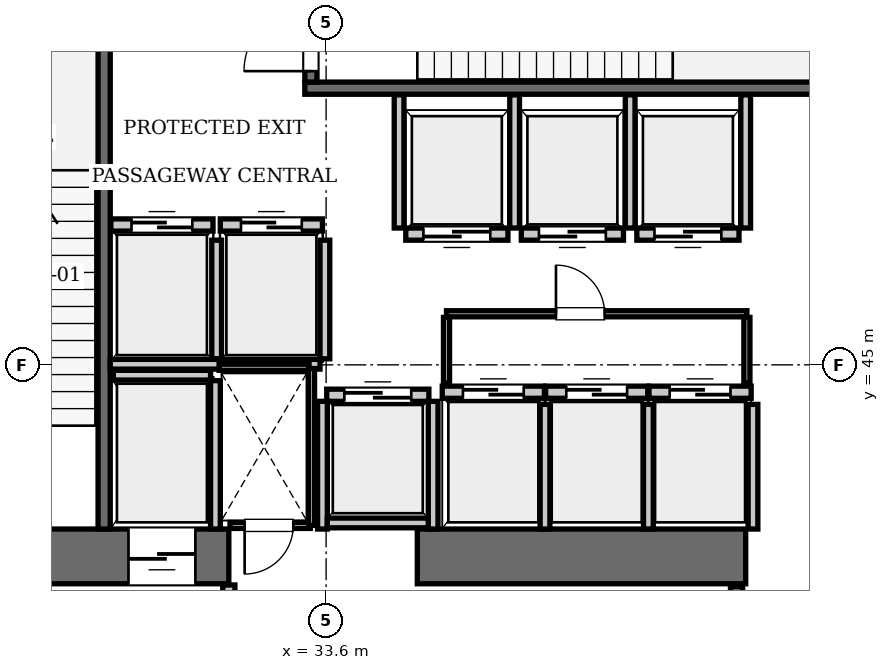
"""IFC4 building model, lengths in metres.
Left out: names, types, materials, properties, quantities, classifications, styles, units other than length and angle.
Written with IfcOpenShell. Run it as: python <this file> out.ifc"""

import sys

from ifc_helpers import new_model, si_unit, direction, frame, frame_2d, origin, place, context, subcontext, project, spatial, rectangle, extrude, element, fill, save


model = new_model("IFC4")
c1 = context("Model", 3, precision=1e-05, world=origin(), true_north=direction((0.0, 1.0)))
c2 = subcontext(c1, "Body", "Model", "MODEL_VIEW")
j1 = project(units=[si_unit("LENGTHUNIT", "METRE"), si_unit("PLANEANGLEUNIT", "RADIAN")], contexts=[c1])
p1 = place(None, origin())
s1 = spatial("IfcSite", under=j1, at=p1, CompositionType="ELEMENT")
p2 = place(p1, origin())
s2 = spatial("IfcBuilding", under=s1, at=p2, CompositionType="ELEMENT")
p3 = place(p2, origin())
s3 = spatial("IfcBuildingStorey", under=s2, at=p3, CompositionType="ELEMENT", Elevation=0.0)
p4 = place(p3, frame((25.2, 41.85, 0.0), z_axis=(0.0, 0.0, 1.0), x_axis=(1.0, 0.0, 0.0)))
e1 = element("IfcWall", 1, at=p4, inside=s3, PredefinedType="SHEAR", context=c2, shape_type="SweptSolid", body=[
    extrude(rectangle(XDim=6.8, YDim=0.9, at=frame_2d((3.4, 0.0))), origin(), (0.0, 0.0, 1.0), 5.6),
])
p5 = place(p4, frame((1.65, 0.0, 0.0)))
e2 = element("IfcOpeningElement", 2, at=p5, cuts=e1, PredefinedType="OPENING", context=c2, shape_type="SweptSolid", body=[
    extrude(rectangle(XDim=1.15, YDim=2.15, at=frame_2d((0.575, 1.075))), frame((0.0, 0.46, 0.0), z_axis=(0.0, -1.0, 0.0), x_axis=(1.0, 0.0, 0.0)), (0.0, 0.0, 1.0), 0.92),
])
p6 = place(p4, frame((5.15, 0.0, 0.0)))
e3 = element("IfcOpeningElement", 3, at=p6, cuts=e1, PredefinedType="OPENING", context=c2, shape_type="SweptSolid", body=[
    extrude(rectangle(XDim=1.1, YDim=2.2, at=frame_2d((0.55, 1.1))), frame((0.0, 0.46, 0.0), z_axis=(0.0, -1.0, 0.0), x_axis=(1.0, 0.0, 0.0)), (0.0, 0.0, 1.0), 0.92),
])
p7 = place(p3, frame((35.1, 41.85, 0.0), z_axis=(0.0, 0.0, 1.0), x_axis=(1.0, 0.0, 0.0)))
e4 = element("IfcWall", 4, at=p7, inside=s3, PredefinedType="SHEAR", context=c2, shape_type="SweptSolid", body=[
    extrude(rectangle(XDim=5.4, YDim=0.9, at=frame_2d((2.7, 0.0))), origin(), (0.0, 0.0, 1.0), 5.6),
])
p8 = place(p3, frame((29.95, 42.3, 0.0), z_axis=(0.0, 0.0, 1.0), x_axis=(0.0, 1.0, 0.0)))
e5 = element("IfcWall", 5, at=p8, inside=s3, PredefinedType="SOLIDWALL", context=c2, shape_type="SweptSolid", body=[
    extrude(rectangle(XDim=8.85, YDim=0.2, at=frame_2d((4.425, 0.0))), origin(), (0.0, 0.0, 1.0), 5.32),
])
p9 = place(p3, frame((33.25, 49.55, 0.0), z_axis=(0.0, 0.0, 1.0), x_axis=(1.0, 0.0, 0.0)))
e6 = element("IfcWall", 6, at=p9, inside=s3, PredefinedType="SOLIDWALL", context=c2, shape_type="SweptSolid", body=[
    extrude(rectangle(XDim=9.1, YDim=0.2, at=frame_2d((4.55, 0.0))), origin(), (0.0, 0.0, 1.0), 5.32),
])
p10 = place(p3, frame((33.35, 49.65, 0.0), z_axis=(0.0, 0.0, 1.0), x_axis=(0.0, 1.0, 0.0)))
e7 = element("IfcWall", 7, at=p10, inside=s3, PredefinedType="SOLIDWALL", context=c2, shape_type="SweptSolid", body=[
    extrude(rectangle(XDim=3.45, YDim=0.2, at=frame_2d((1.725, 0.0))), origin(), (0.0, 0.0, 1.0), 5.32),
])
p11 = place(p10, frame((0.18, 0.0, 0.0)))
e8 = element("IfcOpeningElement", 8, at=p11, cuts=e7, PredefinedType="OPENING", context=c2, shape_type="SweptSolid", body=[
    extrude(rectangle(XDim=1.1, YDim=2.15, at=frame_2d((0.55, 1.075))), frame((0.0, 0.11, 0.0), z_axis=(0.0, -1.0, 0.0), x_axis=(1.0, 0.0, 0.0)), (0.0, 0.0, 1.0), 0.22),
])
p12 = place(p3, frame((30.06, 47.3, 0.0), z_axis=(0.0, 0.0, 1.0), x_axis=(1.0, 0.0, 0.0)))
e9 = element("IfcWall", 9, at=p12, inside=s3, PredefinedType="SOLIDWALL", context=c2, shape_type="SweptSolid", body=[
    extrude(rectangle(XDim=1.68, YDim=0.2, at=frame_2d((0.84, 0.0))), origin(), (0.0, 0.0, 1.0), 5.32),
])
p13 = place(p12, frame((0.34, 0.0, 0.0)))
e10 = element("IfcOpeningElement", 10, at=p13, cuts=e9, PredefinedType="OPENING", context=c2, shape_type="SweptSolid", body=[
    extrude(rectangle(XDim=1.0, YDim=2.15, at=frame_2d((0.5, 1.075))), frame((0.0, 0.11, 0.0), z_axis=(0.0, -1.0, 0.0), x_axis=(1.0, 0.0, 0.0)), (0.0, 0.0, 1.0), 0.22),
])
p14 = place(p3, frame((31.86, 47.3, 0.0), z_axis=(0.0, 0.0, 1.0), x_axis=(1.0, 0.0, 0.0)))
e11 = element("IfcWall", 11, at=p14, inside=s3, PredefinedType="SOLIDWALL", context=c2, shape_type="SweptSolid", body=[
    extrude(rectangle(XDim=1.68, YDim=0.2, at=frame_2d((0.84, 0.0))), origin(), (0.0, 0.0, 1.0), 5.32),
])
p15 = place(p14, frame((0.34, 0.0, 0.0)))
e12 = element("IfcOpeningElement", 12, at=p15, cuts=e11, PredefinedType="OPENING", context=c2, shape_type="SweptSolid", body=[
    extrude(rectangle(XDim=1.0, YDim=2.15, at=frame_2d((0.5, 1.075))), frame((0.0, 0.11, 0.0), z_axis=(0.0, -1.0, 0.0), x_axis=(1.0, 0.0, 0.0)), (0.0, 0.0, 1.0), 0.22),
])
p16 = place(p3, frame((35.51, 44.55, 0.0), z_axis=(0.0, 0.0, 1.0), x_axis=(1.0, 0.0, 0.0)))
e13 = element("IfcWall", 13, at=p16, inside=s3, PredefinedType="SOLIDWALL", context=c2, shape_type="SweptSolid", body=[
    extrude(rectangle(XDim=1.68, YDim=0.2, at=frame_2d((0.84, 0.0))), origin(), (0.0, 0.0, 1.0), 5.32),
])
p17 = place(p16, frame((0.34, 0.0, 0.0)))
e14 = element("IfcOpeningElement", 14, at=p17, cuts=e13, PredefinedType="OPENING", context=c2, shape_type="SweptSolid", body=[
    extrude(rectangle(XDim=1.0, YDim=2.15, at=frame_2d((0.5, 1.075))), frame((0.0, 0.11, 0.0), z_axis=(0.0, -1.0, 0.0), x_axis=(1.0, 0.0, 0.0)), (0.0, 0.0, 1.0), 0.22),
])
p18 = place(p3, frame((37.21, 44.55, 0.0), z_axis=(0.0, 0.0, 1.0), x_axis=(1.0, 0.0, 0.0)))
e15 = element("IfcWall", 15, at=p18, inside=s3, PredefinedType="SOLIDWALL", context=c2, shape_type="SweptSolid", body=[
    extrude(rectangle(XDim=1.68, YDim=0.2, at=frame_2d((0.84, 0.0))), origin(), (0.0, 0.0, 1.0), 5.32),
])
p19 = place(p18, frame((0.34, 0.0, 0.0)))
e16 = element("IfcOpeningElement", 16, at=p19, cuts=e15, PredefinedType="OPENING", context=c2, shape_type="SweptSolid", body=[
    extrude(rectangle(XDim=1.0, YDim=2.15, at=frame_2d((0.5, 1.075))), frame((0.0, 0.11, 0.0), z_axis=(0.0, -1.0, 0.0), x_axis=(1.0, 0.0, 0.0)), (0.0, 0.0, 1.0), 0.22),
])
p20 = place(p3, frame((38.91, 44.55, 0.0), z_axis=(0.0, 0.0, 1.0), x_axis=(1.0, 0.0, 0.0)))
e17 = element("IfcWall", 17, at=p20, inside=s3, PredefinedType="SOLIDWALL", context=c2, shape_type="SweptSolid", body=[
    extrude(rectangle(XDim=1.68, YDim=0.2, at=frame_2d((0.84, 0.0))), origin(), (0.0, 0.0, 1.0), 5.32),
])
p21 = place(p20, frame((0.34, 0.0, 0.0)))
e18 = element("IfcOpeningElement", 18, at=p21, cuts=e17, PredefinedType="OPENING", context=c2, shape_type="SweptSolid", body=[
    extrude(rectangle(XDim=1.0, YDim=2.15, at=frame_2d((0.5, 1.075))), frame((0.0, 0.11, 0.0), z_axis=(0.0, -1.0, 0.0), x_axis=(1.0, 0.0, 0.0)), (0.0, 0.0, 1.0), 0.22),
])
p22 = place(p3, frame((34.91, 47.15, 0.0), z_axis=(0.0, 0.0, 1.0), x_axis=(1.0, 0.0, 0.0)))
e19 = element("IfcWall", 19, at=p22, inside=s3, PredefinedType="SOLIDWALL", context=c2, shape_type="SweptSolid", body=[
    extrude(rectangle(XDim=1.68, YDim=0.2, at=frame_2d((0.84, 0.0))), origin(), (0.0, 0.0, 1.0), 5.32),
])
p23 = place(p22, frame((0.29, 0.0, 0.0)))
e20 = element("IfcOpeningElement", 20, at=p23, cuts=e19, PredefinedType="OPENING", context=c2, shape_type="SweptSolid", body=[
    extrude(rectangle(XDim=1.1, YDim=2.2, at=frame_2d((0.55, 1.1))), frame((0.0, 0.11, 0.0), z_axis=(0.0, -1.0, 0.0), x_axis=(1.0, 0.0, 0.0)), (0.0, 0.0, 1.0), 0.22),
])
p24 = place(p3, frame((36.81, 47.15, 0.0), z_axis=(0.0, 0.0, 1.0), x_axis=(1.0, 0.0, 0.0)))
e21 = element("IfcWall", 21, at=p24, inside=s3, PredefinedType="SOLIDWALL", context=c2, shape_type="SweptSolid", body=[
    extrude(rectangle(XDim=1.68, YDim=0.2, at=frame_2d((0.84, 0.0))), origin(), (0.0, 0.0, 1.0), 5.32),
])
p25 = place(p24, frame((0.29, 0.0, 0.0)))
e22 = element("IfcOpeningElement", 22, at=p25, cuts=e21, PredefinedType="OPENING", context=c2, shape_type="SweptSolid", body=[
    extrude(rectangle(XDim=1.1, YDim=2.2, at=frame_2d((0.55, 1.1))), frame((0.0, 0.11, 0.0), z_axis=(0.0, -1.0, 0.0), x_axis=(1.0, 0.0, 0.0)), (0.0, 0.0, 1.0), 0.22),
])
p26 = place(p3, frame((38.71, 47.15, 0.0), z_axis=(0.0, 0.0, 1.0), x_axis=(1.0, 0.0, 0.0)))
e23 = element("IfcWall", 23, at=p26, inside=s3, PredefinedType="SOLIDWALL", context=c2, shape_type="SweptSolid", body=[
    extrude(rectangle(XDim=1.68, YDim=0.2, at=frame_2d((0.84, 0.0))), origin(), (0.0, 0.0, 1.0), 5.32),
])
p27 = place(p26, frame((0.29, 0.0, 0.0)))
e24 = element("IfcOpeningElement", 24, at=p27, cuts=e23, PredefinedType="OPENING", context=c2, shape_type="SweptSolid", body=[
    extrude(rectangle(XDim=1.1, YDim=2.2, at=frame_2d((0.55, 1.1))), frame((0.0, 0.11, 0.0), z_axis=(0.0, -1.0, 0.0), x_axis=(1.0, 0.0, 0.0)), (0.0, 0.0, 1.0), 0.22),
])
p28 = place(p3, frame((33.61, 44.5, 0.0), z_axis=(0.0, 0.0, 1.0), x_axis=(1.0, 0.0, 0.0)))
e25 = element("IfcWall", 25, at=p28, inside=s3, PredefinedType="SOLIDWALL", context=c2, shape_type="SweptSolid", body=[
    extrude(rectangle(XDim=1.68, YDim=0.2, at=frame_2d((0.84, 0.0))), origin(), (0.0, 0.0, 1.0), 5.32),
])
p29 = place(p28, frame((0.29, 0.0, 0.0)))
e26 = element("IfcOpeningElement", 26, at=p29, cuts=e25, PredefinedType="OPENING", context=c2, shape_type="SweptSolid", body=[
    extrude(rectangle(XDim=1.1, YDim=2.2, at=frame_2d((0.55, 1.1))), frame((0.0, 0.11, 0.0), z_axis=(0.0, -1.0, 0.0), x_axis=(1.0, 0.0, 0.0)), (0.0, 0.0, 1.0), 0.22),
])
p30 = place(p3, frame((30.1, 44.83, 0.0), z_axis=(0.0, 0.0, 1.0), x_axis=(1.0, 0.0, 0.0)))
e27 = element("IfcWall", 27, at=p30, inside=s3, PredefinedType="SOLIDWALL", context=c2, shape_type="SweptSolid", body=[
    extrude(rectangle(XDim=1.6, YDim=0.16, at=frame_2d((0.8, 0.0))), origin(), (0.0, 0.0, 1.0), 5.32),
])
p31 = place(p3, frame((31.78, 42.3, 0.0), z_axis=(0.0, 0.0, 1.0), x_axis=(0.0, 1.0, 0.0)))
e28 = element("IfcWall", 28, at=p31, inside=s3, PredefinedType="SOLIDWALL", context=c2, shape_type="SweptSolid", body=[
    extrude(rectangle(XDim=2.44, YDim=0.16, at=frame_2d((1.22, 0.0))), origin(), (0.0, 0.0, 1.0), 5.32),
])
for number, where, z_axis, x_axis in (
    (29, (31.8, 45.1, 0.0), (0.0, 0.0, 1.0), (0.0, 1.0, 0.0)),
    (30, (33.58, 45.1, 0.0), (0.0, 0.0, 1.0), (0.0, 1.0, 0.0)),
):
    element("IfcWall", number, at=place(p3, frame(where, z_axis=z_axis, x_axis=x_axis)), inside=s3, PredefinedType="SOLIDWALL", context=c2, shape_type="SweptSolid", body=[
        extrude(rectangle(XDim=1.95, YDim=0.16, at=frame_2d((0.975, 0.0))), origin(), (0.0, 0.0, 1.0), 5.32),
    ])
p32 = place(p3, frame((30.05, 45.01, 0.0), z_axis=(0.0, 0.0, 1.0), x_axis=(1.0, 0.0, 0.0)))
e31 = element("IfcWall", 31, at=p32, inside=s3, PredefinedType="SOLIDWALL", context=c2, shape_type="SweptSolid", body=[
    extrude(rectangle(XDim=3.45, YDim=0.16, at=frame_2d((1.725, 0.0))), origin(), (0.0, 0.0, 1.0), 5.32),
])
for number, where, z_axis, x_axis in (
    (32, (37.2, 42.3, 0.0), (0.0, 0.0, 1.0), (0.0, 1.0, 0.0)),
    (33, (38.9, 42.3, 0.0), (0.0, 0.0, 1.0), (0.0, 1.0, 0.0)),
    (34, (40.62, 42.3, 0.0), (0.0, 0.0, 1.0), (0.0, 1.0, 0.0)),
):
    element("IfcWall", number, at=place(p3, frame(where, z_axis=z_axis, x_axis=x_axis)), inside=s3, PredefinedType="SOLIDWALL", context=c2, shape_type="SweptSolid", body=[
        extrude(rectangle(XDim=2.05, YDim=0.16, at=frame_2d((1.025, 0.0))), origin(), (0.0, 0.0, 1.0), 5.32),
    ])
for number, where, z_axis, x_axis in (
    (35, (34.8, 47.25, 0.0), (0.0, 0.0, 1.0), (0.0, 1.0, 0.0)),
    (36, (36.7, 47.25, 0.0), (0.0, 0.0, 1.0), (0.0, 1.0, 0.0)),
    (37, (38.6, 47.25, 0.0), (0.0, 0.0, 1.0), (0.0, 1.0, 0.0)),
    (38, (40.5, 47.25, 0.0), (0.0, 0.0, 1.0), (0.0, 1.0, 0.0)),
):
    element("IfcWall", number, at=place(p3, frame(where, z_axis=z_axis, x_axis=x_axis)), inside=s3, PredefinedType="SOLIDWALL", context=c2, shape_type="SweptSolid", body=[
        extrude(rectangle(XDim=2.19, YDim=0.16, at=frame_2d((1.095, 0.0))), origin(), (0.0, 0.0, 1.0), 5.32),
    ])
for number, where, z_axis, x_axis in (
    (39, (33.54, 42.3, 0.0), (0.0, 0.0, 1.0), (0.0, 1.0, 0.0)),
    (40, (35.36, 42.3, 0.0), (0.0, 0.0, 1.0), (0.0, 1.0, 0.0)),
):
    element("IfcWall", number, at=place(p3, frame(where, z_axis=z_axis, x_axis=x_axis)), inside=s3, PredefinedType="SOLIDWALL", context=c2, shape_type="SweptSolid", body=[
        extrude(rectangle(XDim=2.1, YDim=0.16, at=frame_2d((1.05, 0.0))), origin(), (0.0, 0.0, 1.0), 5.32),
    ])
p33 = place(p3, frame((33.62, 42.4, 0.0), z_axis=(0.0, 0.0, 1.0), x_axis=(1.0, 0.0, 0.0)))
e41 = element("IfcWall", 41, at=p33, inside=s3, PredefinedType="SOLIDWALL", context=c2, shape_type="SweptSolid", body=[
    extrude(rectangle(XDim=1.66, YDim=0.16, at=frame_2d((0.83, 0.0))), origin(), (0.0, 0.0, 1.0), 5.32),
])
p34 = place(p3, frame((32.0, 38.31, 0.0), z_axis=(0.0, 0.0, 1.0), x_axis=(0.0, 1.0, 0.0)))
e42 = element("IfcWall", 42, at=p34, inside=s3, PredefinedType="PARTITIONING", context=c2, shape_type="SweptSolid", body=[
    extrude(rectangle(XDim=3.07, YDim=0.2, at=frame_2d((1.535, 0.0))), origin(), (0.0, 0.0, 1.0), 5.32),
])
p35 = place(p3, frame((32.02, 42.36, 0.0), z_axis=(0.0, 0.0, 1.0), x_axis=(1.0, 0.0, 0.0)))
e43 = element("IfcWall", 43, at=p35, inside=s3, PredefinedType="PARTITIONING", context=c2, shape_type="SweptSolid", body=[
    extrude(rectangle(XDim=1.32, YDim=0.1, at=frame_2d((0.66, 0.0))), origin(), (0.0, 0.0, 1.0), 5.32),
])
p36 = place(p35, frame((0.24, 0.0, 0.0)))
e44 = element("IfcOpeningElement", 44, at=p36, cuts=e43, PredefinedType="OPENING", context=c2, shape_type="SweptSolid", body=[
    extrude(rectangle(XDim=0.8, YDim=2.05, at=frame_2d((0.4, 1.025))), frame((0.0, 0.06, 0.0), z_axis=(0.0, -1.0, 0.0), x_axis=(1.0, 0.0, 0.0)), (0.0, 0.0, 1.0), 0.12),
])
p37 = place(p3, frame((31.84, 44.96, 0.0), z_axis=(0.0, 0.0, 1.0), x_axis=(1.0, 0.0, 0.0)))
e45 = element("IfcWall", 45, at=p37, inside=s3, PredefinedType="PARTITIONING", context=c2, shape_type="SweptSolid", body=[
    extrude(rectangle(XDim=1.48, YDim=0.1, at=frame_2d((0.74, 0.0))), origin(), (0.0, 0.0, 1.0), 5.32),
])
p38 = place(p3, frame((33.36, 42.36, 0.0), z_axis=(0.0, 0.0, 1.0), x_axis=(0.0, 1.0, 0.0)))
e46 = element("IfcWall", 46, at=p38, inside=s3, PredefinedType="PARTITIONING", context=c2, shape_type="SweptSolid", body=[
    extrude(rectangle(XDim=2.58, YDim=0.1, at=frame_2d((1.29, 0.0))), origin(), (0.0, 0.0, 1.0), 5.32),
])
p39 = place(p3, frame((35.58, 45.84, 0.0), z_axis=(0.0, 0.0, 1.0), x_axis=(1.0, 0.0, 0.0)))
e47 = element("IfcWall", 47, at=p39, inside=s3, PredefinedType="PARTITIONING", context=c2, shape_type="SweptSolid", body=[
    extrude(rectangle(XDim=4.94, YDim=0.1, at=frame_2d((2.47, 0.0))), origin(), (0.0, 0.0, 1.0), 5.32),
])
p40 = place(p39, frame((1.8, 0.0, 0.0)))
e48 = element("IfcOpeningElement", 48, at=p40, cuts=e47, PredefinedType="OPENING", context=c2, shape_type="SweptSolid", body=[
    extrude(rectangle(XDim=0.8, YDim=2.05, at=frame_2d((0.4, 1.025))), frame((0.0, 0.06, 0.0), z_axis=(0.0, -1.0, 0.0), x_axis=(1.0, 0.0, 0.0)), (0.0, 0.0, 1.0), 0.12),
])
for number, where, z_axis, x_axis in (
    (49, (35.58, 44.7, 0.0), (0.0, 0.0, 1.0), (0.0, 1.0, 0.0)),
    (50, (40.52, 44.7, 0.0), (0.0, 0.0, 1.0), (0.0, 1.0, 0.0)),
):
    element("IfcWall", number, at=place(p3, frame(where, z_axis=z_axis, x_axis=x_axis)), inside=s3, PredefinedType="PARTITIONING", context=c2, shape_type="SweptSolid", body=[
        extrude(rectangle(XDim=1.08, YDim=0.1, at=frame_2d((0.54, 0.0))), origin(), (0.0, 0.0, 1.0), 5.32),
    ])
p41 = place(p3, frame((40.35, 34.9, 0.0), z_axis=(0.0, 0.0, 1.0), x_axis=(0.0, 1.0, 0.0)))
e51 = element("IfcWall", 51, at=p41, inside=s3, PredefinedType="PARTITIONING", context=c2, shape_type="SweptSolid", body=[
    extrude(rectangle(XDim=6.45, YDim=0.2, at=frame_2d((3.225, 0.0))), origin(), (0.0, 0.0, 1.0), 5.32),
])
p42 = place(p41, frame((2.4, 0.0, 0.0)))
e52 = element("IfcOpeningElement", 52, at=p42, cuts=e51, PredefinedType="OPENING", context=c2, shape_type="SweptSolid", body=[
    extrude(rectangle(XDim=1.15, YDim=2.15, at=frame_2d((0.575, 1.075))), frame((0.0, 0.11, 0.0), z_axis=(0.0, -1.0, 0.0), x_axis=(1.0, 0.0, 0.0)), (0.0, 0.0, 1.0), 0.22),
])
p43 = place(p11, origin())
e53 = element("IfcDoor", 53, at=p43, inside=s3, OperationType="SINGLE_SWING_LEFT", PredefinedType="DOOR", context=c2, shape_type="SweptSolid", body=[
    extrude(rectangle(XDim=1.1, YDim=2.15, at=frame_2d((0.55, 1.075))), frame((0.0, 0.025, 0.0), z_axis=(0.0, -1.0, 0.0), x_axis=(1.0, 0.0, 0.0)), (0.0, 0.0, 1.0), 0.05),
])
fill(e8, e53)
p44 = place(p13, origin())
e54 = element("IfcDoor", 54, at=p44, inside=s3, OperationType="SLIDING_TO_LEFT", PredefinedType="DOOR", context=c2, shape_type="SweptSolid", body=[
    extrude(rectangle(XDim=1.0, YDim=2.15, at=frame_2d((0.5, 1.075))), frame((0.0, 0.025, 0.0), z_axis=(0.0, -1.0, 0.0), x_axis=(1.0, 0.0, 0.0)), (0.0, 0.0, 1.0), 0.05),
])
fill(e10, e54)
p45 = place(p15, origin())
e55 = element("IfcDoor", 55, at=p45, inside=s3, OperationType="SLIDING_TO_LEFT", PredefinedType="DOOR", context=c2, shape_type="SweptSolid", body=[
    extrude(rectangle(XDim=1.0, YDim=2.15, at=frame_2d((0.5, 1.075))), frame((0.0, 0.025, 0.0), z_axis=(0.0, -1.0, 0.0), x_axis=(1.0, 0.0, 0.0)), (0.0, 0.0, 1.0), 0.05),
])
fill(e12, e55)
p46 = place(p17, origin())
e56 = element("IfcDoor", 56, at=p46, inside=s3, OperationType="SLIDING_TO_LEFT", PredefinedType="DOOR", context=c2, shape_type="SweptSolid", body=[
    extrude(rectangle(XDim=1.0, YDim=2.15, at=frame_2d((0.5, 1.075))), frame((0.0, 0.025, 0.0), z_axis=(0.0, -1.0, 0.0), x_axis=(1.0, 0.0, 0.0)), (0.0, 0.0, 1.0), 0.05),
])
fill(e14, e56)
p47 = place(p19, origin())
e57 = element("IfcDoor", 57, at=p47, inside=s3, OperationType="SLIDING_TO_LEFT", PredefinedType="DOOR", context=c2, shape_type="SweptSolid", body=[
    extrude(rectangle(XDim=1.0, YDim=2.15, at=frame_2d((0.5, 1.075))), frame((0.0, 0.025, 0.0), z_axis=(0.0, -1.0, 0.0), x_axis=(1.0, 0.0, 0.0)), (0.0, 0.0, 1.0), 0.05),
])
fill(e16, e57)
p48 = place(p21, origin())
e58 = element("IfcDoor", 58, at=p48, inside=s3, OperationType="SLIDING_TO_LEFT", PredefinedType="DOOR", context=c2, shape_type="SweptSolid", body=[
    extrude(rectangle(XDim=1.0, YDim=2.15, at=frame_2d((0.5, 1.075))), frame((0.0, 0.025, 0.0), z_axis=(0.0, -1.0, 0.0), x_axis=(1.0, 0.0, 0.0)), (0.0, 0.0, 1.0), 0.05),
])
fill(e18, e58)
p49 = place(p23, frame((1.1, 0.0, 0.0), z_axis=(0.0, 0.0, 1.0), x_axis=(-1.0, 0.0, 0.0)))
e59 = element("IfcDoor", 59, at=p49, inside=s3, OperationType="SLIDING_TO_RIGHT", PredefinedType="DOOR", context=c2, shape_type="SweptSolid", body=[
    extrude(rectangle(XDim=1.1, YDim=2.2, at=frame_2d((0.55, 1.1))), frame((0.0, 0.025, 0.0), z_axis=(0.0, -1.0, 0.0), x_axis=(1.0, 0.0, 0.0)), (0.0, 0.0, 1.0), 0.05),
])
fill(e20, e59)
p50 = place(p25, frame((1.1, 0.0, 0.0), z_axis=(0.0, 0.0, 1.0), x_axis=(-1.0, 0.0, 0.0)))
e60 = element("IfcDoor", 60, at=p50, inside=s3, OperationType="SLIDING_TO_RIGHT", PredefinedType="DOOR", context=c2, shape_type="SweptSolid", body=[
    extrude(rectangle(XDim=1.1, YDim=2.2, at=frame_2d((0.55, 1.1))), frame((0.0, 0.025, 0.0), z_axis=(0.0, -1.0, 0.0), x_axis=(1.0, 0.0, 0.0)), (0.0, 0.0, 1.0), 0.05),
])
fill(e22, e60)
p51 = place(p27, frame((1.1, 0.0, 0.0), z_axis=(0.0, 0.0, 1.0), x_axis=(-1.0, 0.0, 0.0)))
e61 = element("IfcDoor", 61, at=p51, inside=s3, OperationType="SLIDING_TO_RIGHT", PredefinedType="DOOR", context=c2, shape_type="SweptSolid", body=[
    extrude(rectangle(XDim=1.1, YDim=2.2, at=frame_2d((0.55, 1.1))), frame((0.0, 0.025, 0.0), z_axis=(0.0, -1.0, 0.0), x_axis=(1.0, 0.0, 0.0)), (0.0, 0.0, 1.0), 0.05),
])
fill(e24, e61)
p52 = place(p29, origin())
e62 = element("IfcDoor", 62, at=p52, inside=s3, OperationType="SLIDING_TO_RIGHT", PredefinedType="DOOR", context=c2, shape_type="SweptSolid", body=[
    extrude(rectangle(XDim=1.1, YDim=2.2, at=frame_2d((0.55, 1.1))), frame((0.0, 0.025, 0.0), z_axis=(0.0, -1.0, 0.0), x_axis=(1.0, 0.0, 0.0)), (0.0, 0.0, 1.0), 0.05),
])
fill(e26, e62)
p53 = place(p6, frame((1.1, 0.0, 0.0), z_axis=(0.0, 0.0, 1.0), x_axis=(-1.0, 0.0, 0.0)))
e63 = element("IfcDoor", 63, at=p53, inside=s3, OperationType="SLIDING_TO_LEFT", PredefinedType="DOOR", context=c2, shape_type="SweptSolid", body=[
    extrude(rectangle(XDim=1.1, YDim=2.2, at=frame_2d((0.55, 1.1))), frame((0.0, 0.025, 0.0), z_axis=(0.0, -1.0, 0.0), x_axis=(1.0, 0.0, 0.0)), (0.0, 0.0, 1.0), 0.05),
])
fill(e3, e63)
p54 = place(p36, frame((0.8, 0.0, 0.0), z_axis=(0.0, 0.0, 1.0), x_axis=(-1.0, 0.0, 0.0)))
e64 = element("IfcDoor", 64, at=p54, inside=s3, OperationType="SINGLE_SWING_RIGHT", PredefinedType="DOOR", context=c2, shape_type="SweptSolid", body=[
    extrude(rectangle(XDim=0.8, YDim=2.05, at=frame_2d((0.4, 1.025))), frame((0.0, 0.025, 0.0), z_axis=(0.0, -1.0, 0.0), x_axis=(1.0, 0.0, 0.0)), (0.0, 0.0, 1.0), 0.05),
])
fill(e44, e64)
p55 = place(p40, origin())
e65 = element("IfcDoor", 65, at=p55, inside=s3, OperationType="SINGLE_SWING_LEFT", PredefinedType="DOOR", context=c2, shape_type="SweptSolid", body=[
    extrude(rectangle(XDim=0.8, YDim=2.05, at=frame_2d((0.4, 1.025))), frame((0.0, 0.025, 0.0), z_axis=(0.0, -1.0, 0.0), x_axis=(1.0, 0.0, 0.0)), (0.0, 0.0, 1.0), 0.05),
])
fill(e48, e65)
save(model, sys.argv[1])
